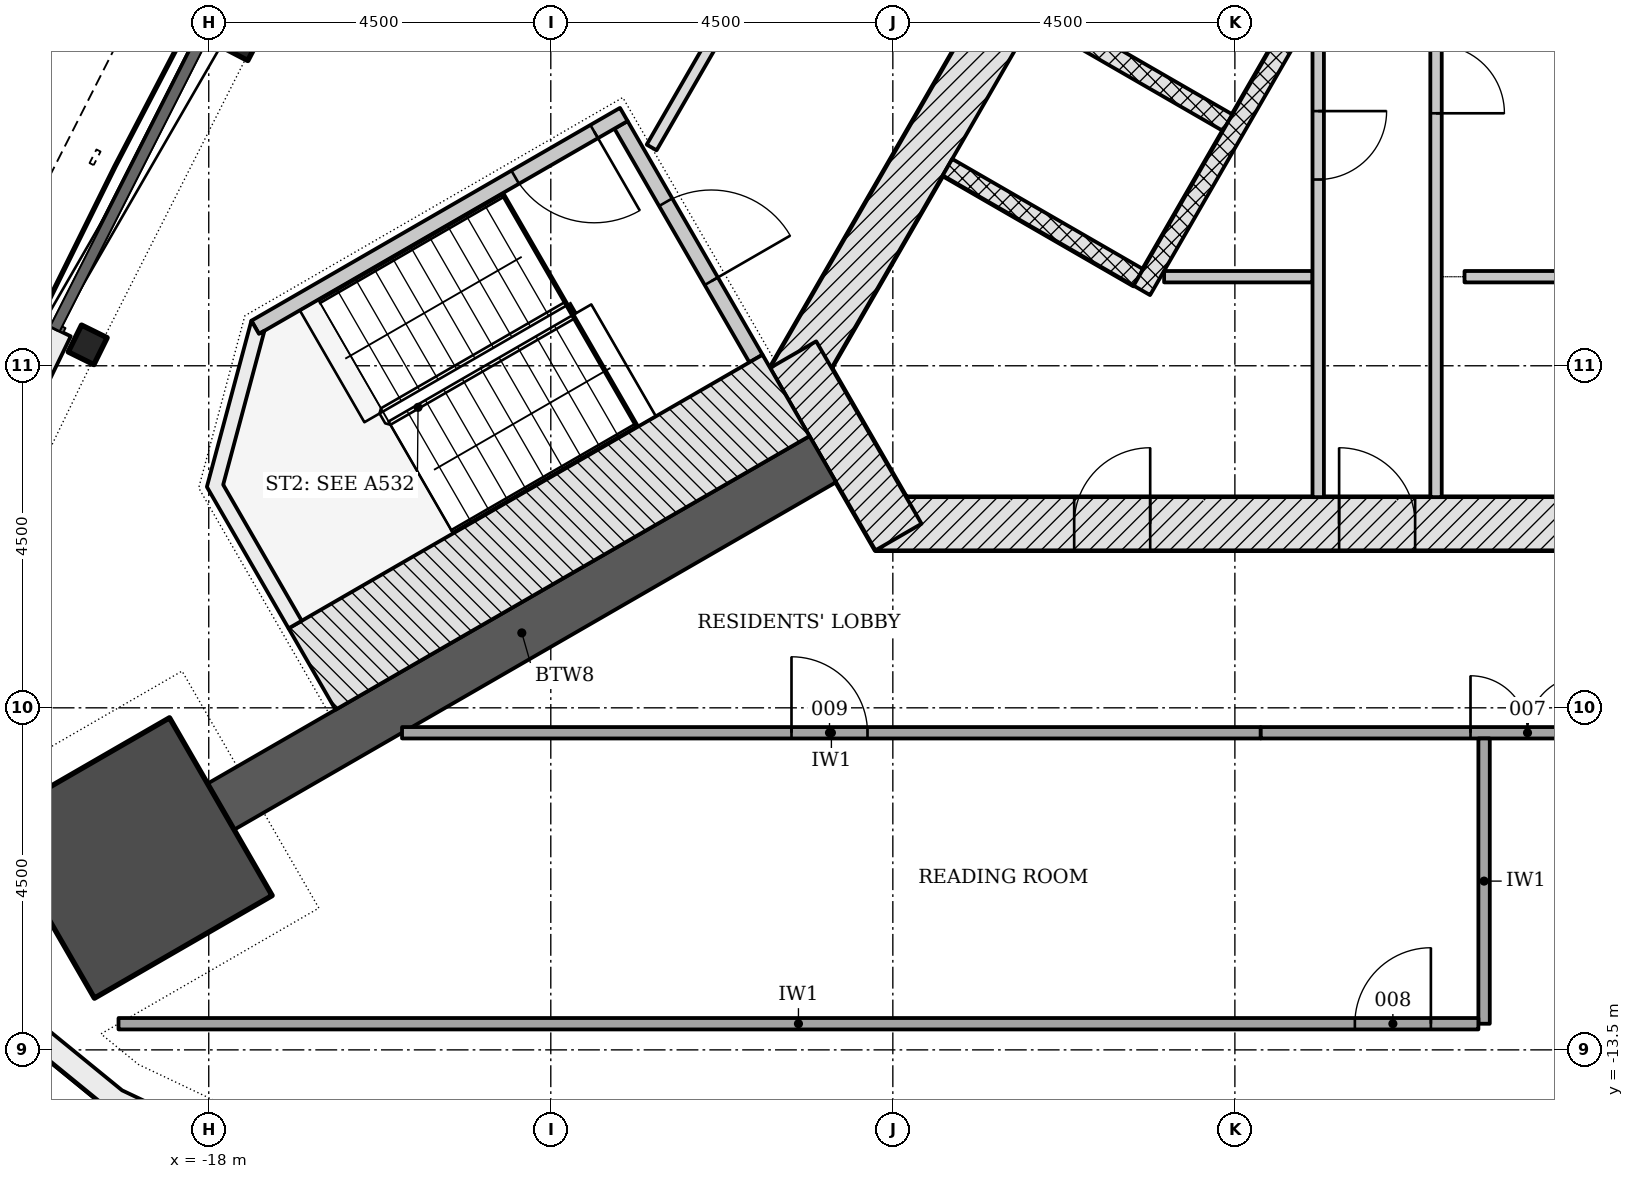
"""IFC4 building model, lengths in metres.
Left out: names, types, materials, properties, quantities, classifications, styles, units other than length and angle.
Written with IfcOpenShell. Run it as: python <this file> out.ifc"""

import sys

from ifc_helpers import new_model, si_unit, direction, frame, frame_2d, origin, origin_2d, place, context, subcontext, project, spatial, polyline, rectangle, i_section, outline, extrude, element, fill, save


model = new_model("IFC4")
c1 = context("Model", 3, precision=1e-05, world=origin(), true_north=direction((0.0, 1.0)))
c2 = subcontext(c1, "Body", "Model", "MODEL_VIEW")
j1 = project(units=[si_unit("LENGTHUNIT", "METRE"), si_unit("PLANEANGLEUNIT", "RADIAN")], contexts=[c1])
p1 = place(None, origin())
s1 = spatial("IfcSite", under=j1, at=p1, CompositionType="ELEMENT")
p2 = place(p1, origin())
s2 = spatial("IfcBuilding", under=s1, at=p2, CompositionType="ELEMENT")
p3 = place(p2, frame((0.0, 0.0, 192.3)))
s3 = spatial("IfcBuildingStorey", under=s2, at=p3, CompositionType="ELEMENT", Elevation=192.3)
p4 = place(p3, frame((-9.229, -6.578, -0.2), z_axis=(0.0, 0.0, 1.0), x_axis=(1.0, 0.0, 0.0)))
e1 = element("IfcWall", 1, at=p4, inside=s3, PredefinedType="SHEAR", context=c2, shape_type="SweptSolid", body=[
    extrude(rectangle(XDim=18.458, YDim=0.7, at=frame_2d((9.229, 0.0))), origin(), (0.0, 0.0, 1.0), 3.6),
])
p5 = place(p4, frame((6.1, 0.0, 0.2)))
e2 = element("IfcOpeningElement", 2, at=p5, cuts=e1, PredefinedType="OPENING", context=c2, shape_type="SweptSolid", body=[
    extrude(rectangle(XDim=1.0, YDim=2.1, at=frame_2d((0.5, 1.05))), frame((0.0, 0.36, 0.0), z_axis=(0.0, -1.0, 0.0), x_axis=(1.0, 0.0, 0.0)), (0.0, 0.0, 1.0), 0.72),
])
p6 = place(p4, frame((2.615, 0.0, 0.2)))
e3 = element("IfcOpeningElement", 3, at=p6, cuts=e1, PredefinedType="OPENING", context=c2, shape_type="SweptSolid", body=[
    extrude(rectangle(XDim=1.0, YDim=2.1, at=frame_2d((0.5, 1.05))), frame((0.0, 0.36, 0.0), z_axis=(0.0, -1.0, 0.0), x_axis=(1.0, 0.0, 0.0)), (0.0, 0.0, 1.0), 0.72),
])
p7 = place(p4, frame((9.198, 0.0, 0.2)))
e4 = element("IfcOpeningElement", 4, at=p7, cuts=e1, PredefinedType="OPENING", context=c2, shape_type="SweptSolid", body=[
    extrude(rectangle(XDim=0.9, YDim=2.1, at=frame_2d((0.45, 1.05))), frame((0.0, 0.36, 0.0), z_axis=(0.0, -1.0, 0.0), x_axis=(1.0, 0.0, 0.0)), (0.0, 0.0, 1.0), 0.72),
])
p8 = place(p4, frame((13.877, 0.0, 0.2)))
e5 = element("IfcOpeningElement", 5, at=p8, cuts=e1, PredefinedType="OPENING", context=c2, shape_type="SweptSolid", body=[
    extrude(rectangle(XDim=0.9, YDim=2.1, at=frame_2d((0.45, 1.05))), frame((0.0, 0.36, 0.0), z_axis=(0.0, -1.0, 0.0), x_axis=(1.0, 0.0, 0.0)), (0.0, 0.0, 1.0), 0.72),
])
p9 = place(p3, frame((-1.083, 11.281, -0.2), z_axis=(0.0, 0.0, 1.0), x_axis=(-0.500001446645, -0.866024568562, 0.0)))
e6 = element("IfcWall", 6, at=p9, inside=s3, PredefinedType="SHEAR", context=c2, shape_type="SweptSolid", body=[
    extrude(rectangle(XDim=18.458, YDim=0.7, at=frame_2d((9.229, 0.0))), origin(), (0.0, 0.0, 1.0), 3.6),
])
p10 = place(p9, frame((8.979, 0.0, 0.2)))
e7 = element("IfcOpeningElement", 7, at=p10, cuts=e6, PredefinedType="OPENING", context=c2, shape_type="SweptSolid", body=[
    extrude(rectangle(XDim=1.2, YDim=2.1, at=frame_2d((0.6, 1.05))), frame((0.0, 0.36, 0.0), z_axis=(0.0, -1.0, 0.0), x_axis=(1.0, 0.0, 0.0)), (0.0, 0.0, 1.0), 0.72),
])
p11 = place(p9, frame((11.029, 0.0, 0.2)))
e8 = element("IfcOpeningElement", 8, at=p11, cuts=e6, PredefinedType="OPENING", context=c2, shape_type="SweptSolid", body=[
    extrude(rectangle(XDim=1.2, YDim=2.1, at=frame_2d((0.6, 1.05))), frame((0.0, 0.36, 0.0), z_axis=(0.0, -1.0, 0.0), x_axis=(1.0, 0.0, 0.0)), (0.0, 0.0, 1.0), 0.72),
])
p12 = place(p3, frame((-10.311, -4.353, -0.2), z_axis=(0.0, 0.0, 1.0), x_axis=(0.500042739161, -0.866000726912, 0.0)))
e9 = element("IfcWall", 9, at=p12, inside=s3, PredefinedType="SHEAR", context=c2, shape_type="SweptSolid", body=[
    extrude(rectangle(XDim=2.771, YDim=0.7, at=frame_2d((1.386, 0.0))), origin(), (0.0, 0.0, 1.0), 3.6),
])
p13 = place(p3, frame((-9.922, -5.728, -0.2), z_axis=(0.0, 0.0, 1.0), x_axis=(-0.866026421479, -0.499998237297, 0.0)))
e10 = element("IfcWall", 10, at=p13, inside=s3, PredefinedType="SHEAR", context=c2, shape_type="SweptSolid", body=[
    extrude(rectangle(XDim=9.145, YDim=0.7, at=frame_2d((4.572, 0.0))), origin(), (0.0, 0.0, 1.0), 3.6),
])
p14 = place(p3, frame((-19.01, -10.976, -0.2), z_axis=(0.0, 0.0, 1.0), x_axis=(-0.866025403784, -0.5, 0.0)))
e11 = element("IfcColumn", 11, at=p14, inside=s3, PredefinedType="COLUMN", context=c2, shape_type="SweptSolid", body=[
    extrude(rectangle(XDim=2.7, YDim=2.7, at=origin_2d()), origin(), (0.0, 0.0, 1.0), 3.6),
])
for number, where, z_axis, x_axis in (
    (12, (-17.562, -0.222, -0.2), (0.0, 0.0, 1.0), (-0.462, -0.887, 0.0)),
    (13, (-19.593, -4.225, -0.2), (0.0, 0.0, 1.0), (-0.443, -0.897, 0.0)),
):
    element("IfcColumn", number, at=place(p3, frame(where, z_axis=z_axis, x_axis=x_axis)), inside=s3, PredefinedType="COLUMN", context=c2, shape_type="SweptSolid", body=[
        extrude(i_section(OverallWidth=0.394, OverallDepth=0.376, WebThickness=0.017, FlangeThickness=0.028, FilletRadius=0.015, at=origin_2d()), origin(), (0.0, 0.0, 1.0), 3.6),
    ])
p15 = place(p3, origin())
e14 = element("IfcWall", 14, at=p15, inside=s3, PredefinedType="NOTDEFINED", context=c2, shape_type="SweptSolid", body=[
    extrude(outline(polyline([(-20.086, -3.981), (-21.463, -6.824), (-21.91, -8.164), (-22.025, -9.572), (-21.798, -10.966), (-21.245, -12.266), (-20.396, -13.395), (-19.302, -14.288), (-18.025, -14.893), (-16.641, -15.175), (-13.49, -15.404), (-13.469, -15.105), (-16.6, -14.877), (-17.929, -14.606), (-19.14, -14.032), (-20.178, -13.186), (-20.983, -12.115), (-21.508, -10.882), (-21.723, -9.56), (-21.615, -8.224), (-21.184, -6.937), (-19.816, -4.112), (-20.086, -3.981)])), origin(), (0.0, 0.0, 1.0), 3.3),
])
for number, where, z_axis, x_axis in (
    (15, (-7.106, 0.148, -0.2), (0.0, 0.0, 1.0), (0.866, -0.5, 0.0)),
    (16, (-8.281, -1.887, -0.2), (0.0, 0.0, 1.0), (0.866, -0.5, 0.0)),
):
    element("IfcWall", number, at=place(p3, frame(where, z_axis=z_axis, x_axis=x_axis)), inside=s3, PredefinedType="PARTITIONING", context=c2, shape_type="SweptSolid", body=[
        extrude(rectangle(XDim=2.9, YDim=0.25, at=frame_2d((1.45, 0.0))), origin(), (0.0, 0.0, 1.0), 3.6),
    ])
p16 = place(p3, frame((-2.374, 2.294, 0.0), z_axis=(0.0, 0.0, 1.0), x_axis=(-0.500003174267, -0.866023571113, 0.0)))
e17 = element("IfcWall", 17, at=p16, inside=s3, PredefinedType="PARTITIONING", context=c2, shape_type="SweptSolid", body=[
    extrude(rectangle(XDim=6.7, YDim=0.25, at=frame_2d((3.35, 0.0))), origin(), (0.0, 0.0, 1.0), 3.4),
])
p17 = place(p3, frame((-5.431, -3.328, 0.0), z_axis=(0.0, 0.0, 1.0), x_axis=(1.0, 0.0, 0.0)))
e18 = element("IfcWall", 18, at=p17, inside=s3, PredefinedType="PARTITIONING", context=c2, shape_type="SweptSolid", body=[
    extrude(rectangle(XDim=1.952, YDim=0.15, at=frame_2d((0.976, 0.0))), origin(), (0.0, 0.0, 1.0), 3.4),
])
p18 = place(p3, frame((-3.404, 0.131, 0.0), z_axis=(0.0, 0.0, 1.0), x_axis=(0.0, -1.0, 0.0)))
e19 = element("IfcWall", 19, at=p18, inside=s3, PredefinedType="PARTITIONING", context=c2, shape_type="SweptSolid", body=[
    extrude(rectangle(XDim=6.359, YDim=0.15, at=frame_2d((3.18, 0.0))), origin(), (0.0, 0.0, 1.0), 3.4),
])
p19 = place(p18, frame((1.281, 0.0, 0.0)))
e20 = element("IfcOpeningElement", 20, at=p19, cuts=e19, PredefinedType="OPENING", context=c2, shape_type="SweptSolid", body=[
    extrude(rectangle(XDim=0.9, YDim=2.1, at=frame_2d((0.45, 1.05))), frame((0.0, 0.085, 0.0), z_axis=(0.0, -1.0, 0.0), x_axis=(1.0, 0.0, 0.0)), (0.0, 0.0, 1.0), 0.17),
])
p20 = place(p3, frame((-1.854, 5.497, 0.0), z_axis=(0.0, 0.0, 1.0), x_axis=(0.0, -1.0, 0.0)))
e21 = element("IfcWall", 21, at=p20, inside=s3, PredefinedType="PARTITIONING", context=c2, shape_type="SweptSolid", body=[
    extrude(rectangle(XDim=11.725, YDim=0.15, at=frame_2d((5.863, 0.0))), origin(), (0.0, 0.0, 1.0), 3.4),
])
p21 = place(p20, frame((5.775, 0.0, 0.0)))
e22 = element("IfcOpeningElement", 22, at=p21, cuts=e21, PredefinedType="OPENING", context=c2, shape_type="SweptSolid", body=[
    extrude(rectangle(XDim=0.9, YDim=2.1, at=frame_2d((0.45, 1.05))), frame((0.0, 0.085, 0.0), z_axis=(0.0, -1.0, 0.0), x_axis=(1.0, 0.0, 0.0)), (0.0, 0.0, 1.0), 0.17),
])
p22 = place(p20, frame((1.364, 0.0, 0.0)))
e23 = element("IfcOpeningElement", 23, at=p22, cuts=e21, PredefinedType="OPENING", context=c2, shape_type="SweptSolid", body=[
    extrude(rectangle(XDim=0.9, YDim=2.1, at=frame_2d((0.45, 1.05))), frame((0.0, 0.085, 0.0), z_axis=(0.0, -1.0, 0.0), x_axis=(1.0, 0.0, 0.0)), (0.0, 0.0, 1.0), 0.17),
])
p23 = place(p3, frame((-1.479, -3.328, 0.0), z_axis=(0.0, 0.0, 1.0), x_axis=(1.0, 0.0, 0.0)))
e24 = element("IfcWall", 24, at=p23, inside=s3, PredefinedType="PARTITIONING", context=c2, shape_type="SweptSolid", body=[
    extrude(rectangle(XDim=10.547, YDim=0.15, at=frame_2d((5.273, 0.0))), origin(), (0.0, 0.0, 1.0), 3.4),
])
p24 = place(p3, frame((-12.576, -1.331, -0.2), z_axis=(0.0, 0.0, 1.0), x_axis=(0.499970499736, -0.8660424351, 0.0)))
e25 = element("IfcWall", 25, at=p24, inside=s3, PredefinedType="SHEAR", context=c2, shape_type="SweptSolid", body=[
    extrude(rectangle(XDim=3.55, YDim=0.2, at=frame_2d((1.775, 0.0))), origin(), (0.0, 0.0, 1.0), 3.6),
])
p25 = place(p24, frame((1.175, 0.0, 0.2)))
e26 = element("IfcOpeningElement", 26, at=p25, cuts=e25, PredefinedType="OPENING", context=c2, shape_type="SweptSolid", body=[
    extrude(rectangle(XDim=1.2, YDim=2.1, at=frame_2d((0.6, 1.05))), frame((0.0, 0.11, 0.0), z_axis=(0.0, -1.0, 0.0), x_axis=(1.0, 0.0, 0.0)), (0.0, 0.0, 1.0), 0.22),
])
p26 = place(p3, frame((-12.539, -1.194, -0.2), z_axis=(0.0, 0.0, 1.0), x_axis=(-0.866045472092, -0.499965239061, 0.0)))
e27 = element("IfcWall", 27, at=p26, inside=s3, PredefinedType="SHEAR", context=c2, shape_type="SweptSolid", body=[
    extrude(rectangle(XDim=5.6, YDim=0.2, at=frame_2d((2.8, 0.0))), origin(), (0.0, 0.0, 1.0), 3.6),
])
p27 = place(p26, frame((0.45, 0.0, 0.2)))
e28 = element("IfcOpeningElement", 28, at=p27, cuts=e27, PredefinedType="OPENING", context=c2, shape_type="SweptSolid", body=[
    extrude(rectangle(XDim=1.2, YDim=2.1, at=frame_2d((0.6, 1.05))), frame((0.0, 0.11, 0.0), z_axis=(0.0, -1.0, 0.0), x_axis=(1.0, 0.0, 0.0)), (0.0, 0.0, 1.0), 0.22),
])
p28 = place(p3, frame((-10.406, -4.89, -0.2), z_axis=(0.0, 0.0, 1.0), x_axis=(-0.866018442252, -0.500012057535, 0.0)))
e29 = element("IfcWall", 29, at=p28, inside=s3, PredefinedType="SHEAR", context=c2, shape_type="SweptSolid", body=[
    extrude(rectangle(XDim=7.2, YDim=1.236, at=frame_2d((3.6, 0.0))), origin(), (0.0, 0.0, 1.0), 3.6),
])
p29 = place(p3, frame((0.0, 0.0, -0.2)))
e30 = element("IfcWall", 30, at=p29, inside=s3, PredefinedType="SHEAR", context=c2, shape_type="SweptSolid", body=[
    extrude(outline(polyline([(-17.439, -3.907), (-18.025, -6.093), (-16.95, -7.955), (-16.777, -7.855), (-17.81, -6.065), (-17.267, -4.039), (-17.339, -4.081), (-17.339, -4.081), (-17.339, -4.081), (-17.339, -4.081), (-17.339, -4.081), (-17.339, -4.081), (-17.339, -4.081), (-17.339, -4.081), (-17.339, -4.081), (-17.339, -4.081), (-17.339, -4.081), (-17.339, -4.081), (-17.339, -4.081), (-17.339, -4.081), (-17.339, -4.081), (-17.339, -4.081), (-17.339, -4.081), (-17.439, -3.907)])), origin(), (0.0, 0.0, 1.0), 3.6),
])
p30 = place(p3, frame((-15.457, -9.328, 0.0), z_axis=(0.0, 0.0, 1.0), x_axis=(1.0, 0.0, 0.0)))
e31 = element("IfcWall", 31, at=p30, inside=s3, PredefinedType="PARTITIONING", context=c2, shape_type="SweptSolid", body=[
    extrude(rectangle(XDim=11.297, YDim=0.15, at=frame_2d((5.649, 0.0))), origin(), (0.0, 0.0, 1.0), 2.852),
])
p31 = place(p30, frame((5.124, 0.0, 0.0)))
e32 = element("IfcOpeningElement", 32, at=p31, cuts=e31, PredefinedType="OPENING", context=c2, shape_type="SweptSolid", body=[
    extrude(rectangle(XDim=1.0, YDim=2.1, at=frame_2d((0.5, 1.05))), frame((0.0, 0.085, 0.0), z_axis=(0.0, -1.0, 0.0), x_axis=(1.0, 0.0, 0.0)), (0.0, 0.0, 1.0), 0.17),
])
p32 = place(p3, frame((-4.16, -9.328, 0.0), z_axis=(0.0, 0.0, 1.0), x_axis=(1.0, 0.0, 0.0)))
e33 = element("IfcWall", 33, at=p32, inside=s3, PredefinedType="PARTITIONING", context=c2, shape_type="SweptSolid", body=[
    extrude(rectangle(XDim=4.36, YDim=0.15, at=frame_2d((2.18, 0.0))), origin(), (0.0, 0.0, 1.0), 2.852),
])
p33 = place(p32, frame((2.76, 0.0, 0.0)))
e34 = element("IfcOpeningElement", 34, at=p33, cuts=e33, PredefinedType="OPENING", context=c2, shape_type="SweptSolid", body=[
    extrude(rectangle(XDim=1.5, YDim=2.1, at=frame_2d((0.75, 1.05))), frame((0.0, 0.085, 0.0), z_axis=(0.0, -1.0, 0.0), x_axis=(1.0, 0.0, 0.0)), (0.0, 0.0, 1.0), 0.17),
])
p34 = place(p3, frame((-1.221, -9.403, 0.0), z_axis=(0.0, 0.0, 1.0), x_axis=(0.0, -1.0, 0.0)))
e35 = element("IfcWall", 35, at=p34, inside=s3, PredefinedType="PARTITIONING", context=c2, shape_type="SweptSolid", body=[
    extrude(rectangle(XDim=3.753, YDim=0.15, at=frame_2d((1.876, 0.0))), origin(), (0.0, 0.0, 1.0), 3.4),
])
p35 = place(p3, frame((-19.187, -13.156, 0.0), z_axis=(0.0, 0.0, 1.0), x_axis=(1.0, 0.0, 0.0)))
e36 = element("IfcWall", 36, at=p35, inside=s3, PredefinedType="PARTITIONING", context=c2, shape_type="SweptSolid", body=[
    extrude(rectangle(XDim=17.891, YDim=0.15, at=frame_2d((8.945, 0.0))), origin(), (0.0, 0.0, 1.0), 2.852),
])
p36 = place(p35, frame((16.266, 0.0, 0.0)))
e37 = element("IfcOpeningElement", 37, at=p36, cuts=e36, PredefinedType="OPENING", context=c2, shape_type="SweptSolid", body=[
    extrude(rectangle(XDim=1.0, YDim=2.1, at=frame_2d((0.5, 1.05))), frame((0.0, 0.085, 0.0), z_axis=(0.0, -1.0, 0.0), x_axis=(1.0, 0.0, 0.0)), (0.0, 0.0, 1.0), 0.17),
])
p37 = place(p3, frame((-8.525, 4.691, 0.0), z_axis=(0.0, 0.0, 1.0), x_axis=(-0.499986021771, -0.866033473968, 0.0)))
e38 = element("IfcWall", 38, at=p37, inside=s3, PredefinedType="PARTITIONING", context=c2, shape_type="SweptSolid", body=[
    extrude(rectangle(XDim=7.297, YDim=0.15, at=frame_2d((3.648, 0.0))), origin(), (0.0, 0.0, 1.0), 2.852),
])
p38 = place(p5, origin())
e39 = element("IfcDoor", 39, at=p38, inside=s3, OperationType="SINGLE_SWING_LEFT", PredefinedType="DOOR", context=c2, shape_type="SweptSolid", body=[
    extrude(rectangle(XDim=1.0, YDim=2.1, at=frame_2d((0.5, 1.05))), frame((0.0, 0.075, 0.0), z_axis=(0.0, -1.0, 0.0), x_axis=(1.0, 0.0, 0.0)), (0.0, 0.0, 1.0), 0.15),
])
fill(e2, e39)
p39 = place(p6, origin())
e40 = element("IfcDoor", 40, at=p39, inside=s3, OperationType="SINGLE_SWING_RIGHT", PredefinedType="DOOR", context=c2, shape_type="SweptSolid", body=[
    extrude(rectangle(XDim=1.0, YDim=2.1, at=frame_2d((0.5, 1.05))), frame((0.0, 0.075, 0.0), z_axis=(0.0, -1.0, 0.0), x_axis=(1.0, 0.0, 0.0)), (0.0, 0.0, 1.0), 0.15),
])
fill(e3, e40)
p40 = place(p19, origin())
e41 = element("IfcDoor", 41, at=p40, inside=s3, OperationType="SINGLE_SWING_LEFT", PredefinedType="DOOR", context=c2, shape_type="SweptSolid", body=[
    extrude(rectangle(XDim=0.9, YDim=2.1, at=frame_2d((0.45, 1.05))), frame((0.0, 0.025, 0.0), z_axis=(0.0, -1.0, 0.0), x_axis=(1.0, 0.0, 0.0)), (0.0, 0.0, 1.0), 0.05),
])
fill(e20, e41)
p41 = place(p21, origin())
e42 = element("IfcDoor", 42, at=p41, inside=s3, OperationType="SINGLE_SWING_RIGHT", PredefinedType="DOOR", context=c2, shape_type="SweptSolid", body=[
    extrude(rectangle(XDim=0.9, YDim=2.1, at=frame_2d((0.45, 1.05))), frame((0.0, 0.025, 0.0), z_axis=(0.0, -1.0, 0.0), x_axis=(1.0, 0.0, 0.0)), (0.0, 0.0, 1.0), 0.05),
])
fill(e22, e42)
p42 = place(p25, origin())
e43 = element("IfcDoor", 43, at=p42, inside=s3, OperationType="SINGLE_SWING_RIGHT", PredefinedType="DOOR", context=c2, shape_type="SweptSolid", body=[
    extrude(rectangle(XDim=1.2, YDim=2.1, at=frame_2d((0.6, 1.05))), frame((0.0, 0.025, 0.0), z_axis=(0.0, -1.0, 0.0), x_axis=(1.0, 0.0, 0.0)), (0.0, 0.0, 1.0), 0.05),
])
fill(e26, e43)
p43 = place(p27, origin())
e44 = element("IfcDoor", 44, at=p43, inside=s3, OperationType="SINGLE_SWING_LEFT", PredefinedType="DOOR", context=c2, shape_type="SweptSolid", body=[
    extrude(rectangle(XDim=1.2, YDim=2.1, at=frame_2d((0.6, 1.05))), frame((0.0, 0.025, 0.0), z_axis=(0.0, -1.0, 0.0), x_axis=(1.0, 0.0, 0.0)), (0.0, 0.0, 1.0), 0.05),
])
fill(e28, e44)
p44 = place(p33, origin())
e45 = element("IfcDoor", 45, at=p44, inside=s3, OperationType="DOUBLE_DOOR_SINGLE_SWING", PredefinedType="DOOR", context=c2, shape_type="SweptSolid", body=[
    extrude(rectangle(XDim=1.5, YDim=2.1, at=frame_2d((0.75, 1.05))), frame((0.0, 0.025, 0.0), z_axis=(0.0, -1.0, 0.0), x_axis=(1.0, 0.0, 0.0)), (0.0, 0.0, 1.0), 0.05),
])
fill(e34, e45)
p45 = place(p36, origin())
e46 = element("IfcDoor", 46, at=p45, inside=s3, OperationType="SINGLE_SWING_RIGHT", PredefinedType="DOOR", context=c2, shape_type="SweptSolid", body=[
    extrude(rectangle(XDim=1.0, YDim=2.1, at=frame_2d((0.5, 1.05))), frame((0.0, 0.025, 0.0), z_axis=(0.0, -1.0, 0.0), x_axis=(1.0, 0.0, 0.0)), (0.0, 0.0, 1.0), 0.05),
])
fill(e37, e46)
p46 = place(p31, origin())
e47 = element("IfcDoor", 47, at=p46, inside=s3, OperationType="SINGLE_SWING_LEFT", PredefinedType="DOOR", context=c2, shape_type="SweptSolid", body=[
    extrude(rectangle(XDim=1.0, YDim=2.1, at=frame_2d((0.5, 1.05))), frame((0.0, 0.025, 0.0), z_axis=(0.0, -1.0, 0.0), x_axis=(1.0, 0.0, 0.0)), (0.0, 0.0, 1.0), 0.05),
])
fill(e32, e47)
save(model, sys.argv[1])
